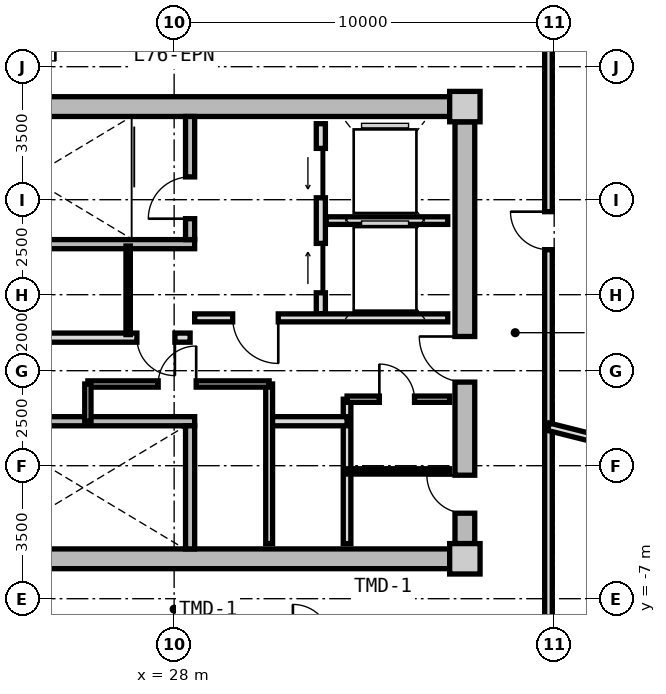
"""IFC4 building model, lengths in metres.
Left out: names, types, materials, properties, quantities, classifications, styles, units other than length and angle.
Written with IfcOpenShell. Run it as: python <this file> out.ifc"""

import sys

from ifc_helpers import new_model, si_unit, direction, frame, frame_2d, origin, origin_2d, place, context, subcontext, project, spatial, rectangle, extrude, source, transform, mapped, element, fill, save


model = new_model("IFC4")
c1 = context("Model", 3, precision=1e-05, world=origin(), true_north=direction((0.0, 1.0)))
c2 = subcontext(c1, "Body", "Model", "MODEL_VIEW")
j1 = project(units=[si_unit("LENGTHUNIT", "METRE"), si_unit("PLANEANGLEUNIT", "RADIAN")], contexts=[c1])
p1 = place(None, origin())
s1 = spatial("IfcSite", under=j1, at=p1, CompositionType="ELEMENT")
p2 = place(p1, origin())
s2 = spatial("IfcBuilding", under=s1, at=p2, CompositionType="ELEMENT")
p3 = place(p2, frame((0.0, 0.0, 244.4)))
s3 = spatial("IfcBuildingStorey", under=s2, at=p3, CompositionType="ELEMENT", Elevation=244.4)
m1 = source(origin(), c2, "Body", "SweptSolid", [
    extrude(rectangle(XDim=0.8, YDim=0.8, at=origin_2d()), origin(), (0.0, 0.0, 1.0), 5.45),
])
for number, where, z_axis, x_axis in (
    (1, (35.65, -5.95, 0.0), (0.0, 0.0, 1.0), (1.0, 0.0, 0.0)),
    (2, (35.65, 5.95, 0.0), (0.0, 0.0, 1.0), (1.0, 0.0, 0.0)),
):
    element("IfcColumn", number, at=place(p3, frame(where, z_axis=z_axis, x_axis=x_axis)), inside=s3, PredefinedType="COLUMN", context=c2, shape_type="MappedRepresentation", body=[
        mapped(m1, transform((0.0, 0.0, 0.0), x_axis=(1.0, 0.0, 0.0), y_axis=(0.0, 1.0, 0.0), z_axis=(0.0, 0.0, 1.0), scale=1.0)),
    ])
m2 = source(origin(), c2, "Body", "SweptSolid", [
    extrude(rectangle(XDim=14.5, YDim=0.52, at=frame_2d((7.25, 0.0))), origin(), (0.0, 0.0, 1.0), 5.175),
])
for number, where, z_axis, x_axis in (
    (3, (20.75, 5.95, 0.0), (0.0, 0.0, 1.0), (1.0, 0.0, 0.0)),
    (4, (35.25, -5.95, 0.0), (0.0, 0.0, 1.0), (-1.0, 0.0, 0.0)),
):
    element("IfcWall", number, at=place(p3, frame(where, z_axis=z_axis, x_axis=x_axis)), inside=s3, PredefinedType="SHEAR", context=c2, shape_type="MappedRepresentation", body=[
        mapped(m2, transform((0.0, 0.0, 0.0), x_axis=(1.0, 0.0, 0.0), y_axis=(0.0, 1.0, 0.0), z_axis=(0.0, 0.0, 1.0), scale=1.0)),
    ])
m3 = source(origin(), c2, "Body", "SweptSolid", [
    extrude(rectangle(XDim=11.1, YDim=0.52, at=frame_2d((5.55, 0.0))), origin(), (0.0, 0.0, 1.0), 5.175),
])
p4 = place(p3, frame((35.65, 5.55, 0.0), z_axis=(0.0, 0.0, 1.0), x_axis=(0.0, -1.0, 0.0)))
e5 = element("IfcWall", 5, at=p4, inside=s3, PredefinedType="SHEAR", context=c2, shape_type="MappedRepresentation", body=[
    mapped(m3, transform((0.0, 0.0, 0.0), x_axis=(1.0, 0.0, 0.0), y_axis=(0.0, 1.0, 0.0), z_axis=(0.0, 0.0, 1.0), scale=1.0)),
])
p5 = place(p4, frame((5.65, 0.0, 0.0)))
e6 = element("IfcOpeningElement", 6, at=p5, cuts=e5, PredefinedType="OPENING", context=c2, shape_type="SweptSolid", body=[
    extrude(rectangle(XDim=1.2, YDim=2.15, at=frame_2d((0.6, 1.075))), frame((0.0, 0.27, 0.0), z_axis=(0.0, -1.0, 0.0), x_axis=(1.0, 0.0, 0.0)), (0.0, 0.0, 1.0), 0.54),
])
p6 = place(p4, frame((9.3, 0.0, 0.0)))
e7 = element("IfcOpeningElement", 7, at=p6, cuts=e5, PredefinedType="OPENING", context=c2, shape_type="SweptSolid", body=[
    extrude(rectangle(XDim=1.0, YDim=2.1, at=frame_2d((0.5, 1.05))), frame((0.0, 0.27, 0.0), z_axis=(0.0, -1.0, 0.0), x_axis=(1.0, 0.0, 0.0)), (0.0, 0.0, 1.0), 0.54),
])
m4 = source(origin(), c2, "Body", "SweptSolid", [
    extrude(rectangle(XDim=7.93, YDim=0.24, at=frame_2d((3.965, 0.0))), origin(), (0.0, 0.0, 1.0), 5.175),
])
p7 = place(p3, frame((20.61, 2.33, 0.0), z_axis=(0.0, 0.0, 1.0), x_axis=(1.0, 0.0, 0.0)))
e8 = element("IfcWall", 8, at=p7, inside=s3, PredefinedType="PARTITIONING", context=c2, shape_type="MappedRepresentation", body=[
    mapped(m4, transform((0.0, 0.0, 0.0), x_axis=(1.0, 0.0, 0.0), y_axis=(0.0, 1.0, 0.0), z_axis=(0.0, 0.0, 1.0), scale=1.0)),
])
m5 = source(origin(), c2, "Body", "SweptSolid", [
    extrude(rectangle(XDim=3.24, YDim=0.24, at=frame_2d((1.62, 0.0))), origin(), (0.0, 0.0, 1.0), 5.175),
])
p8 = place(p3, frame((28.42, 2.45, 0.0), z_axis=(0.0, 0.0, 1.0), x_axis=(0.0, 1.0, 0.0)))
e9 = element("IfcWall", 9, at=p8, inside=s3, PredefinedType="PARTITIONING", context=c2, shape_type="MappedRepresentation", body=[
    mapped(m5, transform((0.0, 0.0, 0.0), x_axis=(1.0, 0.0, 0.0), y_axis=(0.0, 1.0, 0.0), z_axis=(0.0, 0.0, 1.0), scale=1.0)),
])
p9 = place(p8, frame((0.55, 0.0, 0.0)))
e10 = element("IfcOpeningElement", 10, at=p9, cuts=e9, PredefinedType="OPENING", context=c2, shape_type="SweptSolid", body=[
    extrude(rectangle(XDim=1.1, YDim=2.15, at=frame_2d((0.55, 1.075))), frame((0.0, 0.13, 0.0), z_axis=(0.0, -1.0, 0.0), x_axis=(1.0, 0.0, 0.0)), (0.0, 0.0, 1.0), 0.26),
])
p10 = place(p3, frame((20.61, -2.33, 0.0), z_axis=(0.0, 0.0, 1.0), x_axis=(1.0, 0.0, 0.0)))
e11 = element("IfcWall", 11, at=p10, inside=s3, PredefinedType="PARTITIONING", context=c2, shape_type="MappedRepresentation", body=[
    mapped(m4, transform((0.0, 0.0, 0.0), x_axis=(1.0, 0.0, 0.0), y_axis=(0.0, 1.0, 0.0), z_axis=(0.0, 0.0, 1.0), scale=1.0)),
])
p11 = place(p10, frame((1.05, 0.0, 0.0)))
e12 = element("IfcOpeningElement", 12, at=p11, cuts=e11, PredefinedType="OPENING", context=c2, shape_type="SweptSolid", body=[
    extrude(rectangle(XDim=1.1, YDim=2.15, at=frame_2d((0.55, 1.075))), frame((0.0, 0.13, 0.0), z_axis=(0.0, -1.0, 0.0), x_axis=(1.0, 0.0, 0.0)), (0.0, 0.0, 1.0), 0.26),
])
p12 = place(p3, frame((28.42, -5.69, 0.0), z_axis=(0.0, 0.0, 1.0), x_axis=(0.0, 1.0, 0.0)))
e13 = element("IfcWall", 13, at=p12, inside=s3, PredefinedType="PARTITIONING", context=c2, shape_type="MappedRepresentation", body=[
    mapped(m5, transform((0.0, 0.0, 0.0), x_axis=(1.0, 0.0, 0.0), y_axis=(0.0, 1.0, 0.0), z_axis=(0.0, 0.0, 1.0), scale=1.0)),
])
m6 = source(origin(), c2, "Body", "SweptSolid", [
    extrude(rectangle(XDim=5.0, YDim=0.24, at=frame_2d((2.5, 0.0))), origin(), (0.0, 0.0, 1.0), 5.16),
])
p13 = place(p3, frame((31.86, 0.5, 0.0), z_axis=(0.0, 0.0, 1.0), x_axis=(0.0, 1.0, 0.0)))
e14 = element("IfcWall", 14, at=p13, inside=s3, PredefinedType="PARTITIONING", context=c2, shape_type="MappedRepresentation", body=[
    mapped(m6, transform((0.0, 0.0, 0.0), x_axis=(1.0, 0.0, 0.0), y_axis=(0.0, 1.0, 0.0), z_axis=(0.0, 0.0, 1.0), scale=1.0)),
])
p14 = place(p13, frame((3.05, 0.0, 0.0)))
e15 = element("IfcOpeningElement", 15, at=p14, cuts=e14, PredefinedType="OPENING", context=c2, shape_type="SweptSolid", body=[
    extrude(rectangle(XDim=1.3, YDim=2.2, at=frame_2d((0.65, 1.1))), frame((0.0, 0.13, 0.0), z_axis=(0.0, -1.0, 0.0), x_axis=(1.0, 0.0, 0.0)), (0.0, 0.0, 1.0), 0.26),
])
p15 = place(p13, frame((0.55, 0.0, 0.0)))
e16 = element("IfcOpeningElement", 16, at=p15, cuts=e14, PredefinedType="OPENING", context=c2, shape_type="SweptSolid", body=[
    extrude(rectangle(XDim=1.3, YDim=2.2, at=frame_2d((0.65, 1.1))), frame((0.0, 0.13, 0.0), z_axis=(0.0, -1.0, 0.0), x_axis=(1.0, 0.0, 0.0)), (0.0, 0.0, 1.0), 0.26),
])
m7 = source(origin(), c2, "Body", "SweptSolid", [
    extrude(rectangle(XDim=3.2, YDim=0.2, at=frame_2d((1.6, 0.0))), origin(), (0.0, 0.0, 1.0), 5.16),
])
p16 = place(p3, frame((32.0, 2.95, 0.0), z_axis=(0.0, 0.0, 1.0), x_axis=(1.0, 0.0, 0.0)))
e17 = element("IfcWall", 17, at=p16, inside=s3, PredefinedType="PARTITIONING", context=c2, shape_type="MappedRepresentation", body=[
    mapped(m7, transform((0.0, 0.0, 0.0), x_axis=(1.0, 0.0, 0.0), y_axis=(0.0, 1.0, 0.0), z_axis=(0.0, 0.0, 1.0), scale=1.0)),
])
m8 = source(origin(), c2, "Body", "SweptSolid", [
    extrude(rectangle(XDim=6.66, YDim=0.21, at=frame_2d((3.33, 0.0))), origin(), (0.0, 0.0, 1.0), 5.16),
])
p17 = place(p3, frame((28.54, 0.39, 0.0), z_axis=(0.0, 0.0, 1.0), x_axis=(1.0, 0.0, 0.0)))
e18 = element("IfcWall", 18, at=p17, inside=s3, PredefinedType="PARTITIONING", context=c2, shape_type="MappedRepresentation", body=[
    mapped(m8, transform((0.0, 0.0, 0.0), x_axis=(1.0, 0.0, 0.0), y_axis=(0.0, 1.0, 0.0), z_axis=(0.0, 0.0, 1.0), scale=1.0)),
])
p18 = place(p17, frame((1.0, 0.0, 0.0)))
e19 = element("IfcOpeningElement", 19, at=p18, cuts=e18, PredefinedType="OPENING", context=c2, shape_type="SweptSolid", body=[
    extrude(rectangle(XDim=1.2, YDim=2.15, at=frame_2d((0.6, 1.075))), frame((0.0, 0.115, 0.0), z_axis=(0.0, -1.0, 0.0), x_axis=(1.0, 0.0, 0.0)), (0.0, 0.0, 1.0), 0.23),
])
m9 = source(origin(), c2, "Body", "SweptSolid", [
    extrude(rectangle(XDim=7.62, YDim=0.24, at=frame_2d((3.81, 0.0))), origin(), (0.0, 0.0, 1.0), 5.16),
])
p19 = place(p3, frame((20.8, -0.13, 0.0), z_axis=(0.0, 0.0, 1.0), x_axis=(1.0, 0.0, 0.0)))
e20 = element("IfcWall", 20, at=p19, inside=s3, PredefinedType="PARTITIONING", context=c2, shape_type="MappedRepresentation", body=[
    mapped(m9, transform((0.0, 0.0, 0.0), x_axis=(1.0, 0.0, 0.0), y_axis=(0.0, 1.0, 0.0), z_axis=(0.0, 0.0, 1.0), scale=1.0)),
])
p20 = place(p19, frame((6.22, 0.0, 0.0)))
e21 = element("IfcOpeningElement", 21, at=p20, cuts=e20, PredefinedType="OPENING", context=c2, shape_type="SweptSolid", body=[
    extrude(rectangle(XDim=1.0, YDim=2.1, at=frame_2d((0.5, 1.05))), frame((0.0, 0.13, 0.0), z_axis=(0.0, -1.0, 0.0), x_axis=(1.0, 0.0, 0.0)), (0.0, 0.0, 1.0), 0.26),
])
p21 = place(p19, frame((2.4, 0.0, 0.0)))
e22 = element("IfcOpeningElement", 22, at=p21, cuts=e20, PredefinedType="OPENING", context=c2, shape_type="SweptSolid", body=[
    extrude(rectangle(XDim=1.0, YDim=2.1, at=frame_2d((0.5, 1.05))), frame((0.0, 0.13, 0.0), z_axis=(0.0, -1.0, 0.0), x_axis=(1.0, 0.0, 0.0)), (0.0, 0.0, 1.0), 0.26),
])
m10 = source(origin(), c2, "Body", "SweptSolid", [
    extrude(rectangle(XDim=2.33, YDim=0.115, at=frame_2d((1.165, 0.0))), origin(), (0.0, 0.0, 1.0), 5.16),
])
p22 = place(p3, frame((26.79, -0.05, 0.0), z_axis=(0.0, 0.0, 1.0), x_axis=(0.0, 1.0, 0.0)))
e23 = element("IfcWall", 23, at=p22, inside=s3, PredefinedType="PARTITIONING", context=c2, shape_type="MappedRepresentation", body=[
    mapped(m10, transform((0.0, 0.0, 0.0), x_axis=(1.0, 0.0, 0.0), y_axis=(0.0, 1.0, 0.0), z_axis=(0.0, 0.0, 1.0), scale=1.0)),
])
m11 = source(origin(), c2, "Body", "SweptSolid", [
    extrude(rectangle(XDim=3.8, YDim=0.2, at=frame_2d((1.9, 0.0))), origin(), (0.0, 0.0, 1.0), 5.16),
])
p23 = place(p3, frame((32.55, -5.55, 0.0), z_axis=(0.0, 0.0, 1.0), x_axis=(0.0, 1.0, 0.0)))
e24 = element("IfcWall", 24, at=p23, inside=s3, PredefinedType="PARTITIONING", context=c2, shape_type="MappedRepresentation", body=[
    mapped(m11, transform((0.0, 0.0, 0.0), x_axis=(1.0, 0.0, 0.0), y_axis=(0.0, 1.0, 0.0), z_axis=(0.0, 0.0, 1.0), scale=1.0)),
])
m12 = source(origin(), c2, "Body", "SweptSolid", [
    extrude(rectangle(XDim=2.05, YDim=0.24, at=frame_2d((1.025, 0.0))), origin(), (0.0, 0.0, 1.0), 5.16),
])
p24 = place(p3, frame((30.5, -2.33, 0.0), z_axis=(0.0, 0.0, 1.0), x_axis=(1.0, 0.0, 0.0)))
e25 = element("IfcWall", 25, at=p24, inside=s3, PredefinedType="PARTITIONING", context=c2, shape_type="MappedRepresentation", body=[
    mapped(m12, transform((0.0, 0.0, 0.0), x_axis=(1.0, 0.0, 0.0), y_axis=(0.0, 1.0, 0.0), z_axis=(0.0, 0.0, 1.0), scale=1.0)),
])
m13 = source(origin(), c2, "Body", "SweptSolid", [
    extrude(rectangle(XDim=4.2, YDim=0.18, at=frame_2d((2.1, 0.0))), origin(), (0.0, 0.0, 1.0), 5.16),
])
p25 = place(p3, frame((30.5, -5.55, 0.0), z_axis=(0.0, 0.0, 1.0), x_axis=(0.0, 1.0, 0.0)))
e26 = element("IfcWall", 26, at=p25, inside=s3, PredefinedType="PARTITIONING", context=c2, shape_type="MappedRepresentation", body=[
    mapped(m13, transform((0.0, 0.0, 0.0), x_axis=(1.0, 0.0, 0.0), y_axis=(0.0, 1.0, 0.0), z_axis=(0.0, 0.0, 1.0), scale=1.0)),
])
m14 = source(origin(), c2, "Body", "SweptSolid", [
    extrude(rectangle(XDim=4.77, YDim=0.165, at=frame_2d((2.385, 0.0))), origin(), (0.0, 0.0, 1.0), 5.16),
])
p26 = place(p3, frame((25.73, -1.35, 0.0), z_axis=(0.0, 0.0, 1.0), x_axis=(1.0, 0.0, 0.0)))
e27 = element("IfcWall", 27, at=p26, inside=s3, PredefinedType="PARTITIONING", context=c2, shape_type="MappedRepresentation", body=[
    mapped(m14, transform((0.0, 0.0, 0.0), x_axis=(1.0, 0.0, 0.0), y_axis=(0.0, 1.0, 0.0), z_axis=(0.0, 0.0, 1.0), scale=1.0)),
])
p27 = place(p26, frame((1.85, 0.0, 0.0)))
e28 = element("IfcOpeningElement", 28, at=p27, cuts=e27, PredefinedType="OPENING", context=c2, shape_type="SweptSolid", body=[
    extrude(rectangle(XDim=1.0, YDim=2.1, at=frame_2d((0.5, 1.05))), frame((0.0, 0.093, 0.0), z_axis=(0.0, -1.0, 0.0), x_axis=(1.0, 0.0, 0.0)), (0.0, 0.0, 1.0), 0.185),
])
m15 = source(origin(), c2, "Body", "SweptSolid", [
    extrude(rectangle(XDim=0.98, YDim=0.165, at=frame_2d((0.49, 0.0))), origin(), (0.0, 0.0, 1.0), 5.16),
])
p28 = place(p3, frame((25.73, -2.33, 0.0), z_axis=(0.0, 0.0, 1.0), x_axis=(0.0, 1.0, 0.0)))
e29 = element("IfcWall", 29, at=p28, inside=s3, PredefinedType="PARTITIONING", context=c2, shape_type="MappedRepresentation", body=[
    mapped(m15, transform((0.0, 0.0, 0.0), x_axis=(1.0, 0.0, 0.0), y_axis=(0.0, 1.0, 0.0), z_axis=(0.0, 0.0, 1.0), scale=1.0)),
])
m16 = source(origin(), c2, "Body", "SweptSolid", [
    extrude(rectangle(XDim=2.7, YDim=0.165, at=frame_2d((1.35, 0.0))), origin(), (0.0, 0.0, 1.0), 5.16),
])
p29 = place(p3, frame((32.55, -1.75, 0.0), z_axis=(0.0, 0.0, 1.0), x_axis=(1.0, 0.0, 0.0)))
e30 = element("IfcWall", 30, at=p29, inside=s3, PredefinedType="PARTITIONING", context=c2, shape_type="MappedRepresentation", body=[
    mapped(m16, transform((0.0, 0.0, 0.0), x_axis=(1.0, 0.0, 0.0), y_axis=(0.0, 1.0, 0.0), z_axis=(0.0, 0.0, 1.0), scale=1.0)),
])
p30 = place(p29, frame((0.85, 0.0, 0.0)))
e31 = element("IfcOpeningElement", 31, at=p30, cuts=e30, PredefinedType="OPENING", context=c2, shape_type="SweptSolid", body=[
    extrude(rectangle(XDim=0.925, YDim=2.1, at=frame_2d((0.462, 1.05))), frame((0.0, 0.093, 0.0), z_axis=(0.0, -1.0, 0.0), x_axis=(1.0, 0.0, 0.0)), (0.0, 0.0, 1.0), 0.185),
])
m17 = source(origin(), c2, "Body", "SweptSolid", [
    extrude(rectangle(XDim=2.7, YDim=0.14, at=frame_2d((1.35, 0.0))), origin(), (0.0, 0.0, 1.0), 5.16),
])
p31 = place(p3, frame((32.55, -3.65, 0.0), z_axis=(0.0, 0.0, 1.0), x_axis=(1.0, 0.0, 0.0)))
e32 = element("IfcWall", 32, at=p31, inside=s3, PredefinedType="PARTITIONING", context=c2, shape_type="MappedRepresentation", body=[
    mapped(m17, transform((0.0, 0.0, 0.0), x_axis=(1.0, 0.0, 0.0), y_axis=(0.0, 1.0, 0.0), z_axis=(0.0, 0.0, 1.0), scale=1.0)),
])
m18 = source(origin(), c2, "Body", "SweptSolid", [
    extrude(rectangle(XDim=16.3, YDim=0.2, at=frame_2d((8.15, 0.0))), origin(), (0.0, 0.0, 1.0), 5.16),
])
p32 = place(p3, frame((37.85, 8.15, 0.0), z_axis=(0.0, 0.0, 1.0), x_axis=(0.0, -1.0, 0.0)))
e33 = element("IfcWall", 33, at=p32, inside=s3, PredefinedType="PARTITIONING", context=c2, shape_type="MappedRepresentation", body=[
    mapped(m18, transform((0.0, 0.0, 0.0), x_axis=(1.0, 0.0, 0.0), y_axis=(0.0, 1.0, 0.0), z_axis=(0.0, 0.0, 1.0), scale=1.0)),
])
p33 = place(p32, frame((4.966, 0.0, 0.0)))
e34 = element("IfcOpeningElement", 34, at=p33, cuts=e33, PredefinedType="OPENING", context=c2, shape_type="SweptSolid", body=[
    extrude(rectangle(XDim=1.0, YDim=2.1, at=frame_2d((0.5, 1.05))), frame((0.0, 0.11, 0.0), z_axis=(0.0, -1.0, 0.0), x_axis=(1.0, 0.0, 0.0)), (0.0, 0.0, 1.0), 0.22),
])
m19 = source(origin(), c2, "Body", "SweptSolid", [
    extrude(rectangle(XDim=5.879, YDim=0.2, at=frame_2d((2.939, 0.0))), origin(), (0.0, 0.0, 1.0), 4.76),
])
p34 = place(p3, frame((37.85, -2.475, 0.0), z_axis=(0.0, 0.0, 1.0), x_axis=(0.96984127658, -0.24373735504, 0.0)))
e35 = element("IfcWall", 35, at=p34, inside=s3, PredefinedType="PARTITIONING", context=c2, shape_type="MappedRepresentation", body=[
    mapped(m19, transform((0.0, 0.0, 0.0), x_axis=(1.0, 0.0, 0.0), y_axis=(0.0, 1.0, 0.0), z_axis=(0.0, 0.0, 1.0), scale=1.0)),
])
m20 = source(origin(), c2, "Body", "SweptSolid", [
    extrude(rectangle(XDim=1.1, YDim=2.15, at=frame_2d((0.55, 1.075))), frame((0.0, 0.025, 0.0), z_axis=(0.0, -1.0, 0.0), x_axis=(1.0, 0.0, 0.0)), (0.0, 0.0, 1.0), 0.05),
])
p35 = place(p9, origin())
e36 = element("IfcDoor", 36, at=p35, inside=s3, OperationType="SINGLE_SWING_LEFT", PredefinedType="DOOR", context=c2, shape_type="MappedRepresentation", body=[
    mapped(m20, transform((0.0, 0.0, 0.0), x_axis=(1.0, 0.0, 0.0), y_axis=(0.0, 1.0, 0.0), z_axis=(0.0, 0.0, 1.0), scale=1.0)),
])
fill(e10, e36)
m21 = source(origin(), c2, "Body", "SweptSolid", [
    extrude(rectangle(XDim=1.3, YDim=2.2, at=frame_2d((0.65, 1.1))), frame((0.0, 0.025, 0.0), z_axis=(0.0, -1.0, 0.0), x_axis=(1.0, 0.0, 0.0)), (0.0, 0.0, 1.0), 0.05),
])
p36 = place(p14, origin())
e37 = element("IfcDoor", 37, at=p36, inside=s3, OperationType="SLIDING_TO_LEFT", PredefinedType="DOOR", context=c2, shape_type="MappedRepresentation", body=[
    mapped(m21, transform((0.0, 0.0, 0.0), x_axis=(1.0, 0.0, 0.0), y_axis=(0.0, 1.0, 0.0), z_axis=(0.0, 0.0, 1.0), scale=1.0)),
])
fill(e15, e37)
p37 = place(p15, origin())
e38 = element("IfcDoor", 38, at=p37, inside=s3, OperationType="SLIDING_TO_RIGHT", PredefinedType="DOOR", context=c2, shape_type="MappedRepresentation", body=[
    mapped(m21, transform((0.0, 0.0, 0.0), x_axis=(1.0, 0.0, 0.0), y_axis=(0.0, 1.0, 0.0), z_axis=(0.0, 0.0, 1.0), scale=1.0)),
])
fill(e16, e38)
m22 = source(origin(), c2, "Body", "SweptSolid", [
    extrude(rectangle(XDim=1.2, YDim=2.15, at=frame_2d((0.6, 1.075))), frame((0.0, 0.025, 0.0), z_axis=(0.0, -1.0, 0.0), x_axis=(1.0, 0.0, 0.0)), (0.0, 0.0, 1.0), 0.05),
])
p38 = place(p18, frame((1.2, 0.0, 0.0), z_axis=(0.0, 0.0, 1.0), x_axis=(-1.0, 0.0, 0.0)))
e39 = element("IfcDoor", 39, at=p38, inside=s3, OperationType="SINGLE_SWING_LEFT", PredefinedType="DOOR", context=c2, shape_type="MappedRepresentation", body=[
    mapped(m22, transform((0.0, 0.0, 0.0), x_axis=(1.0, 0.0, 0.0), y_axis=(0.0, 1.0, 0.0), z_axis=(0.0, 0.0, 1.0), scale=1.0)),
])
fill(e19, e39)
p39 = place(p5, frame((1.2, 0.0, 0.0), z_axis=(0.0, 0.0, 1.0), x_axis=(-1.0, 0.0, 0.0)))
e40 = element("IfcDoor", 40, at=p39, inside=s3, OperationType="SINGLE_SWING_RIGHT", PredefinedType="DOOR", context=c2, shape_type="MappedRepresentation", body=[
    mapped(m22, transform((0.0, 0.0, 0.0), x_axis=(1.0, 0.0, 0.0), y_axis=(0.0, 1.0, 0.0), z_axis=(0.0, 0.0, 1.0), scale=1.0)),
])
fill(e6, e40)
m23 = source(origin(), c2, "Body", "SweptSolid", [
    extrude(rectangle(XDim=1.0, YDim=2.1, at=frame_2d((0.5, 1.05))), frame((0.0, 0.025, 0.0), z_axis=(0.0, -1.0, 0.0), x_axis=(1.0, 0.0, 0.0)), (0.0, 0.0, 1.0), 0.05),
])
p40 = place(p20, frame((1.0, 0.0, 0.0), z_axis=(0.0, 0.0, 1.0), x_axis=(-1.0, 0.0, 0.0)))
e41 = element("IfcDoor", 41, at=p40, inside=s3, OperationType="SINGLE_SWING_LEFT", PredefinedType="DOOR", context=c2, shape_type="MappedRepresentation", body=[
    mapped(m23, transform((0.0, 0.0, 0.0), x_axis=(1.0, 0.0, 0.0), y_axis=(0.0, 1.0, 0.0), z_axis=(0.0, 0.0, 1.0), scale=1.0)),
])
fill(e21, e41)
p41 = place(p27, origin())
e42 = element("IfcDoor", 42, at=p41, inside=s3, OperationType="SINGLE_SWING_RIGHT", PredefinedType="DOOR", context=c2, shape_type="MappedRepresentation", body=[
    mapped(m23, transform((0.0, 0.0, 0.0), x_axis=(1.0, 0.0, 0.0), y_axis=(0.0, 1.0, 0.0), z_axis=(0.0, 0.0, 1.0), scale=1.0)),
])
fill(e28, e42)
m24 = source(origin(), c2, "Body", "SweptSolid", [
    extrude(rectangle(XDim=0.925, YDim=2.1, at=frame_2d((0.462, 1.05))), frame((0.0, 0.025, 0.0), z_axis=(0.0, -1.0, 0.0), x_axis=(1.0, 0.0, 0.0)), (0.0, 0.0, 1.0), 0.05),
])
p42 = place(p30, origin())
e43 = element("IfcDoor", 43, at=p42, inside=s3, OperationType="SINGLE_SWING_LEFT", PredefinedType="DOOR", context=c2, shape_type="MappedRepresentation", body=[
    mapped(m24, transform((0.0, 0.0, 0.0), x_axis=(1.0, 0.0, 0.0), y_axis=(0.0, 1.0, 0.0), z_axis=(0.0, 0.0, 1.0), scale=1.0)),
])
fill(e31, e43)
p43 = place(p6, frame((1.0, 0.0, 0.0), z_axis=(0.0, 0.0, 1.0), x_axis=(-1.0, 0.0, 0.0)))
e44 = element("IfcDoor", 44, at=p43, inside=s3, OperationType="SINGLE_SWING_RIGHT", PredefinedType="DOOR", context=c2, shape_type="MappedRepresentation", body=[
    mapped(m23, transform((0.0, 0.0, 0.0), x_axis=(1.0, 0.0, 0.0), y_axis=(0.0, 1.0, 0.0), z_axis=(0.0, 0.0, 1.0), scale=1.0)),
])
fill(e7, e44)
p44 = place(p33, frame((1.0, 0.0, 0.0), z_axis=(0.0, 0.0, 1.0), x_axis=(-1.0, 0.0, 0.0)))
e45 = element("IfcDoor", 45, at=p44, inside=s3, OperationType="SINGLE_SWING_RIGHT", PredefinedType="DOOR", context=c2, shape_type="MappedRepresentation", body=[
    mapped(m23, transform((0.0, 0.0, 0.0), x_axis=(1.0, 0.0, 0.0), y_axis=(0.0, 1.0, 0.0), z_axis=(0.0, 0.0, 1.0), scale=1.0)),
])
fill(e34, e45)
save(model, sys.argv[1])
